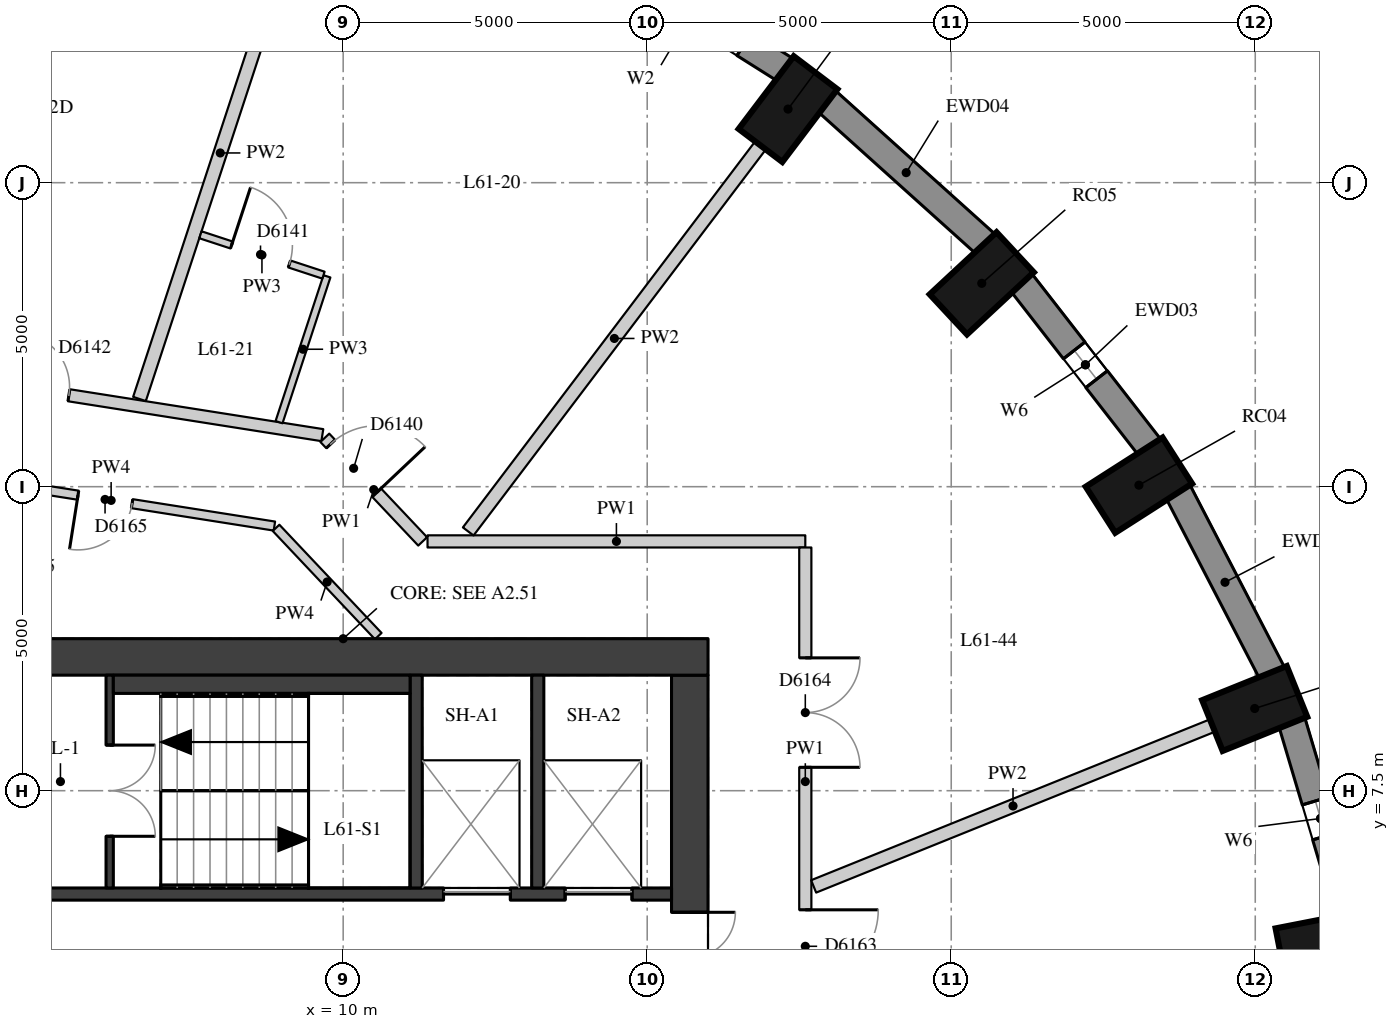
"""IFC4 building model, lengths in metres.
Left out: names, types, materials, properties, quantities, classifications, styles, units other than length and angle.
Written with IfcOpenShell. Run it as: python <this file> out.ifc"""

import sys

from ifc_helpers import new_model, si_unit, direction, frame, frame_2d, origin, origin_2d, place, context, subcontext, project, spatial, rectangle, extrude, element, fill, save


model = new_model("IFC4")
c1 = context("Model", 3, precision=1e-05, world=origin(), true_north=direction((0.0, 1.0)))
c2 = subcontext(c1, "Body", "Model", "MODEL_VIEW")
j1 = project(units=[si_unit("LENGTHUNIT", "METRE"), si_unit("PLANEANGLEUNIT", "RADIAN")], contexts=[c1])
p1 = place(None, origin())
s1 = spatial("IfcSite", under=j1, at=p1, CompositionType="ELEMENT")
p2 = place(p1, origin())
s2 = spatial("IfcBuilding", under=s1, at=p2, CompositionType="ELEMENT")
p3 = place(p2, frame((0.0, 0.0, 215.6)))
s3 = spatial("IfcBuildingStorey", under=s2, at=p3, CompositionType="ELEMENT", Elevation=215.6)
for number, where, z_axis, x_axis in (
    (1, (26.157, 4.937, 0.0), (0.0, 0.0, 1.0), (0.981, 0.192, 0.0)),
    (2, (24.991, 8.852, 0.0), (0.0, 0.0, 1.0), (0.927, 0.374, 0.0)),
    (3, (23.087, 12.525, 0.0), (0.0, 0.0, 1.0), (0.842, 0.539, 0.0)),
    (4, (20.502, 15.845, 0.0), (0.0, 0.0, 1.0), (0.732, 0.681, 0.0)),
    (5, (17.316, 18.71, 0.0), (0.0, 0.0, 1.0), (0.604, 0.797, 0.0)),
):
    element("IfcColumn", number, at=place(p3, frame(where, z_axis=z_axis, x_axis=x_axis)), inside=s3, PredefinedType="COLUMN", context=c2, shape_type="SweptSolid", body=[
        extrude(rectangle(XDim=1.5, YDim=0.9, at=origin_2d()), origin(), (0.0, 0.0, 1.0), 3.3),
    ])
p4 = place(p3, frame((26.548, 5.452, 0.0), z_axis=(0.0, 0.0, 1.0), x_axis=(-0.285444972963, 0.958395099847, 0.0)))
e6 = element("IfcWall", 6, at=p4, inside=s3, PredefinedType="SOLIDWALL", context=c2, shape_type="SweptSolid", body=[
    extrude(rectangle(XDim=3.32, YDim=0.45, at=frame_2d((1.66, 0.0))), origin(), (0.0, 0.0, 1.0), 3.02),
])
p5 = place(p4, frame((1.36, 0.0, 0.4)))
e7 = element("IfcOpeningElement", 7, at=p5, cuts=e6, PredefinedType="OPENING", context=c2, shape_type="SweptSolid", body=[
    extrude(rectangle(XDim=0.6, YDim=1.75, at=frame_2d((0.3, 0.875))), frame((0.0, 0.235, 0.0), z_axis=(0.0, -1.0, 0.0), x_axis=(1.0, 0.0, 0.0)), (0.0, 0.0, 1.0), 0.47),
])
p6 = place(p3, frame((25.278, 9.432, 0.0), z_axis=(0.0, 0.0, 1.0), x_axis=(-0.460175500475, 0.887827972505, 0.0)))
e8 = element("IfcWall", 8, at=p6, inside=s3, PredefinedType="SOLIDWALL", context=c2, shape_type="SweptSolid", body=[
    extrude(rectangle(XDim=3.371, YDim=0.45, at=frame_2d((1.685, 0.0))), origin(), (0.0, 0.0, 1.0), 3.02),
])
p7 = place(p3, frame((23.263, 13.148, 0.0), z_axis=(0.0, 0.0, 1.0), x_axis=(-0.614220816451, 0.789134201919, 0.0)))
e9 = element("IfcWall", 9, at=p7, inside=s3, PredefinedType="SOLIDWALL", context=c2, shape_type="SweptSolid", body=[
    extrude(rectangle(XDim=3.438, YDim=0.45, at=frame_2d((1.719, 0.0))), origin(), (0.0, 0.0, 1.0), 3.02),
])
p8 = place(p7, frame((1.419, 0.0, 0.4)))
e10 = element("IfcOpeningElement", 10, at=p8, cuts=e9, PredefinedType="OPENING", context=c2, shape_type="SweptSolid", body=[
    extrude(rectangle(XDim=0.6, YDim=1.75, at=frame_2d((0.3, 0.875))), frame((0.0, 0.235, 0.0), z_axis=(0.0, -1.0, 0.0), x_axis=(1.0, 0.0, 0.0)), (0.0, 0.0, 1.0), 0.47),
])
p9 = place(p3, frame((20.565, 16.49, 0.0), z_axis=(0.0, 0.0, 1.0), x_axis=(-0.743442727602, 0.668799604348, 0.0)))
e11 = element("IfcWall", 11, at=p9, inside=s3, PredefinedType="SOLIDWALL", context=c2, shape_type="SweptSolid", body=[
    extrude(rectangle(XDim=3.513, YDim=0.45, at=frame_2d((1.756, 0.0))), origin(), (0.0, 0.0, 1.0), 3.02),
])
p10 = place(p3, frame((17.267, 19.358, 0.0), z_axis=(0.0, 0.0, 1.0), x_axis=(-0.846119146727, 0.532993798783, 0.0)))
e12 = element("IfcWall", 12, at=p10, inside=s3, PredefinedType="SOLIDWALL", context=c2, shape_type="SweptSolid", body=[
    extrude(rectangle(XDim=3.587, YDim=0.45, at=frame_2d((1.793, 0.0))), origin(), (0.0, 0.0, 1.0), 3.02),
])
p11 = place(p10, frame((0.793, 0.0, 0.4)))
e13 = element("IfcOpeningElement", 13, at=p11, cuts=e12, PredefinedType="OPENING", context=c2, shape_type="SweptSolid", body=[
    extrude(rectangle(XDim=2.0, YDim=1.75, at=frame_2d((1.0, 0.875))), frame((0.0, 0.235, 0.0), z_axis=(0.0, -1.0, 0.0), x_axis=(1.0, 0.0, 0.0)), (0.0, 0.0, 1.0), 0.47),
])
p12 = place(p3, frame((15.7, -9.4, 0.0), z_axis=(0.0, 0.0, 1.0), x_axis=(0.0, 1.0, 0.0)))
e14 = element("IfcWall", 14, at=p12, inside=s3, PredefinedType="SHEAR", context=c2, shape_type="SweptSolid", body=[
    extrude(rectangle(XDim=18.8, YDim=0.6, at=frame_2d((9.4, 0.0))), origin(), (0.0, 0.0, 1.0), 3.02),
])
p13 = place(p12, frame((13.4, 0.0, 0.0)))
e15 = element("IfcOpeningElement", 15, at=p13, cuts=e14, PredefinedType="OPENING", context=c2, shape_type="SweptSolid", body=[
    extrude(rectangle(XDim=1.5, YDim=2.1, at=frame_2d((0.75, 1.05))), frame((0.0, 0.31, 0.0), z_axis=(0.0, -1.0, 0.0), x_axis=(1.0, 0.0, 0.0)), (0.0, 0.0, 1.0), 0.62),
])
p14 = place(p12, frame((3.9, 0.0, 0.0)))
e16 = element("IfcOpeningElement", 16, at=p14, cuts=e14, PredefinedType="OPENING", context=c2, shape_type="SweptSolid", body=[
    extrude(rectangle(XDim=1.5, YDim=2.1, at=frame_2d((0.75, 1.05))), frame((0.0, 0.31, 0.0), z_axis=(0.0, -1.0, 0.0), x_axis=(1.0, 0.0, 0.0)), (0.0, 0.0, 1.0), 0.62),
])
p15 = place(p3, frame((4.0, 9.7, 0.0), z_axis=(0.0, 0.0, 1.0), x_axis=(1.0, 0.0, 0.0)))
e17 = element("IfcWall", 17, at=p15, inside=s3, PredefinedType="SHEAR", context=c2, shape_type="SweptSolid", body=[
    extrude(rectangle(XDim=12.0, YDim=0.6, at=frame_2d((6.0, 0.0))), origin(), (0.0, 0.0, 1.0), 3.02),
])
p16 = place(p3, frame((4.6, 5.8, 0.0), z_axis=(0.0, 0.0, 1.0), x_axis=(1.0, 0.0, 0.0)))
e18 = element("IfcWall", 18, at=p16, inside=s3, PredefinedType="SHEAR", context=c2, shape_type="SweptSolid", body=[
    extrude(rectangle(XDim=10.8, YDim=0.2, at=frame_2d((5.4, 0.0))), origin(), (0.0, 0.0, 1.0), 3.02),
])
p17 = place(p16, frame((7.05, 0.0, 0.0)))
e19 = element("IfcOpeningElement", 19, at=p17, cuts=e18, PredefinedType="OPENING", context=c2, shape_type="SweptSolid", body=[
    extrude(rectangle(XDim=1.1, YDim=2.1, at=frame_2d((0.55, 1.05))), frame((0.0, 0.11, 0.0), z_axis=(0.0, -1.0, 0.0), x_axis=(1.0, 0.0, 0.0)), (0.0, 0.0, 1.0), 0.22),
])
p18 = place(p16, frame((9.05, 0.0, 0.0)))
e20 = element("IfcOpeningElement", 20, at=p18, cuts=e18, PredefinedType="OPENING", context=c2, shape_type="SweptSolid", body=[
    extrude(rectangle(XDim=1.1, YDim=2.1, at=frame_2d((0.55, 1.05))), frame((0.0, 0.11, 0.0), z_axis=(0.0, -1.0, 0.0), x_axis=(1.0, 0.0, 0.0)), (0.0, 0.0, 1.0), 0.22),
])
for number, where, z_axis, x_axis in (
    (21, (11.2, 5.9, 0.0), (0.0, 0.0, 1.0), (0.0, 1.0, 0.0)),
    (22, (13.2, 5.9, 0.0), (0.0, 0.0, 1.0), (0.0, 1.0, 0.0)),
):
    element("IfcWall", number, at=place(p3, frame(where, z_axis=z_axis, x_axis=x_axis)), inside=s3, PredefinedType="SHEAR", context=c2, shape_type="SweptSolid", body=[
        extrude(rectangle(XDim=3.5, YDim=0.2, at=frame_2d((1.75, 0.0))), origin(), (0.0, 0.0, 1.0), 3.02),
    ])
p19 = place(p3, frame((6.16, 5.9, 0.0), z_axis=(0.0, 0.0, 1.0), x_axis=(0.0, 1.0, 0.0)))
e23 = element("IfcWall", 23, at=p19, inside=s3, PredefinedType="SHEAR", context=c2, shape_type="SweptSolid", body=[
    extrude(rectangle(XDim=3.5, YDim=0.12, at=frame_2d((1.75, 0.0))), origin(), (0.0, 0.0, 1.0), 3.02),
])
p20 = place(p19, frame((0.85, 0.0, 0.0)))
e24 = element("IfcOpeningElement", 24, at=p20, cuts=e23, PredefinedType="OPENING", context=c2, shape_type="SweptSolid", body=[
    extrude(rectangle(XDim=1.5, YDim=2.1, at=frame_2d((0.75, 1.05))), frame((0.0, 0.07, 0.0), z_axis=(0.0, -1.0, 0.0), x_axis=(1.0, 0.0, 0.0)), (0.0, 0.0, 1.0), 0.14),
])
p21 = place(p3, frame((6.22, 9.25, 0.0), z_axis=(0.0, 0.0, 1.0), x_axis=(1.0, 0.0, 0.0)))
e25 = element("IfcWall", 25, at=p21, inside=s3, PredefinedType="PARTITIONING", context=c2, shape_type="SweptSolid", body=[
    extrude(rectangle(XDim=4.88, YDim=0.3, at=frame_2d((2.44, 0.0))), origin(), (0.0, 0.0, 1.0), 3.02),
])
p22 = place(p3, frame((-2.383, 15.243, 0.0), z_axis=(0.0, 0.0, 1.0), x_axis=(0.987842256944, -0.15545956193, 0.0)))
e26 = element("IfcWall", 26, at=p22, inside=s3, PredefinedType="PARTITIONING", context=c2, shape_type="SweptSolid", body=[
    extrude(rectangle(XDim=12.188, YDim=0.2, at=frame_2d((6.094, 0.0))), origin(), (0.0, 0.0, 1.0), 2.42),
])
p23 = place(p22, frame((7.069, 0.0, 0.0)))
e27 = element("IfcOpeningElement", 27, at=p23, cuts=e26, PredefinedType="OPENING", context=c2, shape_type="SweptSolid", body=[
    extrude(rectangle(XDim=0.9, YDim=2.1, at=frame_2d((0.45, 1.05))), frame((0.0, 0.11, 0.0), z_axis=(0.0, -1.0, 0.0), x_axis=(1.0, 0.0, 0.0)), (0.0, 0.0, 1.0), 0.22),
])
p24 = place(p22, frame((3.676, 0.0, 0.0)))
e28 = element("IfcOpeningElement", 28, at=p24, cuts=e26, PredefinedType="OPENING", context=c2, shape_type="SweptSolid", body=[
    extrude(rectangle(XDim=0.9, YDim=2.1, at=frame_2d((0.45, 1.05))), frame((0.0, 0.11, 0.0), z_axis=(0.0, -1.0, 0.0), x_axis=(1.0, 0.0, 0.0)), (0.0, 0.0, 1.0), 0.22),
])
p25 = place(p22, frame((1.875, 0.0, 0.0)))
e29 = element("IfcOpeningElement", 29, at=p25, cuts=e26, PredefinedType="OPENING", context=c2, shape_type="SweptSolid", body=[
    extrude(rectangle(XDim=0.9, YDim=2.1, at=frame_2d((0.45, 1.05))), frame((0.0, 0.11, 0.0), z_axis=(0.0, -1.0, 0.0), x_axis=(1.0, 0.0, 0.0)), (0.0, 0.0, 1.0), 0.22),
])
p26 = place(p3, frame((9.698, 13.304, 0.0), z_axis=(0.0, 0.0, 1.0), x_axis=(0.686553169295, -0.727079600684, 0.0)))
e30 = element("IfcWall", 30, at=p26, inside=s3, PredefinedType="PARTITIONING", context=c2, shape_type="SweptSolid", body=[
    extrude(rectangle(XDim=2.344, YDim=0.2, at=frame_2d((1.172, 0.0))), origin(), (0.0, 0.0, 1.0), 3.02),
])
p27 = place(p26, frame((0.14, 0.0, 0.0)))
e31 = element("IfcOpeningElement", 31, at=p27, cuts=e30, PredefinedType="OPENING", context=c2, shape_type="SweptSolid", body=[
    extrude(rectangle(XDim=1.1, YDim=2.1, at=frame_2d((0.55, 1.05))), frame((0.0, 0.11, 0.0), z_axis=(0.0, -1.0, 0.0), x_axis=(1.0, 0.0, 0.0)), (0.0, 0.0, 1.0), 0.22),
])
p28 = place(p3, frame((11.387, 11.6, 0.0), z_axis=(0.0, 0.0, 1.0), x_axis=(1.0, 0.0, 0.0)))
e32 = element("IfcWall", 32, at=p28, inside=s3, PredefinedType="PARTITIONING", context=c2, shape_type="SweptSolid", body=[
    extrude(rectangle(XDim=6.213, YDim=0.2, at=frame_2d((3.106, 0.0))), origin(), (0.0, 0.0, 1.0), 3.02),
])
p29 = place(p3, frame((17.6, 11.5, 0.0), z_axis=(0.0, 0.0, 1.0), x_axis=(0.0, -1.0, 0.0)))
e33 = element("IfcWall", 33, at=p29, inside=s3, PredefinedType="PARTITIONING", context=c2, shape_type="SweptSolid", body=[
    extrude(rectangle(XDim=7.7, YDim=0.2, at=frame_2d((3.85, 0.0))), origin(), (0.0, 0.0, 1.0), 3.02),
])
p30 = place(p29, frame((5.959, 0.0, 0.0)))
e34 = element("IfcOpeningElement", 34, at=p30, cuts=e33, PredefinedType="OPENING", context=c2, shape_type="SweptSolid", body=[
    extrude(rectangle(XDim=1.2, YDim=2.1, at=frame_2d((0.6, 1.05))), frame((0.0, 0.11, 0.0), z_axis=(0.0, -1.0, 0.0), x_axis=(1.0, 0.0, 0.0)), (0.0, 0.0, 1.0), 0.22),
])
p31 = place(p29, frame((1.815, 0.0, 0.0)))
e35 = element("IfcOpeningElement", 35, at=p31, cuts=e33, PredefinedType="OPENING", context=c2, shape_type="SweptSolid", body=[
    extrude(rectangle(XDim=1.8, YDim=2.1, at=frame_2d((0.9, 1.05))), frame((0.0, 0.11, 0.0), z_axis=(0.0, -1.0, 0.0), x_axis=(1.0, 0.0, 0.0)), (0.0, 0.0, 1.0), 0.22),
])
p32 = place(p3, frame((3.499, 12.697, 0.0), z_axis=(0.0, 0.0, 1.0), x_axis=(0.987853106423, -0.155390605029, 0.0)))
e36 = element("IfcWall", 36, at=p32, inside=s3, PredefinedType="PARTITIONING", context=c2, shape_type="SweptSolid", body=[
    extrude(rectangle(XDim=5.436, YDim=0.15, at=frame_2d((2.718, 0.0))), origin(), (0.0, 0.0, 1.0), 3.02),
])
p33 = place(p32, frame((2.167, 0.0, 0.0)))
e37 = element("IfcOpeningElement", 37, at=p33, cuts=e36, PredefinedType="OPENING", context=c2, shape_type="SweptSolid", body=[
    extrude(rectangle(XDim=0.9, YDim=2.1, at=frame_2d((0.45, 1.05))), frame((0.0, 0.085, 0.0), z_axis=(0.0, -1.0, 0.0), x_axis=(1.0, 0.0, 0.0)), (0.0, 0.0, 1.0), 0.17),
])
p34 = place(p3, frame((8.896, 11.823, 0.0), z_axis=(0.0, 0.0, 1.0), x_axis=(0.686471254033, -0.727156941373, 0.0)))
e38 = element("IfcWall", 38, at=p34, inside=s3, PredefinedType="PARTITIONING", context=c2, shape_type="SweptSolid", body=[
    extrude(rectangle(XDim=2.448, YDim=0.15, at=frame_2d((1.224, 0.0))), origin(), (0.0, 0.0, 1.0), 3.02),
])
p35 = place(p3, frame((24.295, 8.571, 0.0), z_axis=(0.0, 0.0, 1.0), x_axis=(-0.927386999215, -0.374103399728, 0.0)))
e39 = element("IfcWall", 39, at=p35, inside=s3, PredefinedType="PARTITIONING", context=c2, shape_type="SweptSolid", body=[
    extrude(rectangle(XDim=7.072, YDim=0.22, at=frame_2d((3.536, 0.0))), origin(), (0.0, 0.0, 1.0), 3.02),
])
p36 = place(p3, frame((16.863, 18.113, 0.0), z_axis=(0.0, 0.0, 1.0), x_axis=(-0.603628639054, -0.797265618294, 0.0)))
e40 = element("IfcWall", 40, at=p36, inside=s3, PredefinedType="PARTITIONING", context=c2, shape_type="SweptSolid", body=[
    extrude(rectangle(XDim=7.963, YDim=0.22, at=frame_2d((3.982, 0.0))), origin(), (0.0, 0.0, 1.0), 3.02),
])
p37 = place(p3, frame((9.307, 22.035, 0.0), z_axis=(0.0, 0.0, 1.0), x_axis=(-0.311959631661, -0.950095357432, 0.0)))
e41 = element("IfcWall", 41, at=p37, inside=s3, PredefinedType="PARTITIONING", context=c2, shape_type="SweptSolid", body=[
    extrude(rectangle(XDim=8.518, YDim=0.22, at=frame_2d((4.259, 0.0))), origin(), (0.0, 0.0, 1.0), 3.02),
])
p38 = place(p3, frame((8.945, 13.561, 0.0), z_axis=(0.0, 0.0, 1.0), x_axis=(0.311960021399, 0.950095229463, 0.0)))
e42 = element("IfcWall", 42, at=p38, inside=s3, PredefinedType="PARTITIONING", context=c2, shape_type="SweptSolid", body=[
    extrude(rectangle(XDim=2.525, YDim=0.12, at=frame_2d((1.262, 0.0))), origin(), (0.0, 0.0, 1.0), 3.02),
])
p39 = place(p3, frame((9.676, 15.979, 0.0), z_axis=(0.0, 0.0, 1.0), x_axis=(-0.950106513103, 0.311925654217, 0.0)))
e43 = element("IfcWall", 43, at=p39, inside=s3, PredefinedType="PARTITIONING", context=c2, shape_type="SweptSolid", body=[
    extrude(rectangle(XDim=2.13, YDim=0.12, at=frame_2d((1.065, 0.0))), origin(), (0.0, 0.0, 1.0), 3.02),
])
p40 = place(p39, frame((0.59, 0.0, 0.0)))
e44 = element("IfcOpeningElement", 44, at=p40, cuts=e43, PredefinedType="OPENING", context=c2, shape_type="SweptSolid", body=[
    extrude(rectangle(XDim=1.0, YDim=2.1, at=frame_2d((0.5, 1.05))), frame((0.0, 0.07, 0.0), z_axis=(0.0, -1.0, 0.0), x_axis=(1.0, 0.0, 0.0)), (0.0, 0.0, 1.0), 0.14),
])
p41 = place(p5, origin())
e45 = element("IfcWindow", 45, at=p41, inside=s3, PartitioningType="SINGLE_PANEL", PredefinedType="WINDOW", context=c2, shape_type="SweptSolid", body=[
    extrude(rectangle(XDim=0.6, YDim=1.75, at=frame_2d((0.3, 0.875))), frame((0.0, 0.035, 0.0), z_axis=(0.0, -1.0, 0.0), x_axis=(1.0, 0.0, 0.0)), (0.0, 0.0, 1.0), 0.06),
])
fill(e7, e45)
p42 = place(p8, origin())
e46 = element("IfcWindow", 46, at=p42, inside=s3, PartitioningType="SINGLE_PANEL", PredefinedType="WINDOW", context=c2, shape_type="SweptSolid", body=[
    extrude(rectangle(XDim=0.6, YDim=1.75, at=frame_2d((0.3, 0.875))), frame((0.0, 0.035, 0.0), z_axis=(0.0, -1.0, 0.0), x_axis=(1.0, 0.0, 0.0)), (0.0, 0.0, 1.0), 0.06),
])
fill(e10, e46)
p43 = place(p13, origin())
e47 = element("IfcDoor", 47, at=p43, inside=s3, OperationType="DOUBLE_DOOR_SINGLE_SWING", PredefinedType="DOOR", context=c2, shape_type="SweptSolid", body=[
    extrude(rectangle(XDim=1.5, YDim=2.1, at=frame_2d((0.75, 1.05))), frame((0.0, 0.025, 0.0), z_axis=(0.0, -1.0, 0.0), x_axis=(1.0, 0.0, 0.0)), (0.0, 0.0, 1.0), 0.05),
])
fill(e15, e47)
p44 = place(p20, origin())
e48 = element("IfcDoor", 48, at=p44, inside=s3, OperationType="DOUBLE_DOOR_SINGLE_SWING", PredefinedType="DOOR", context=c2, shape_type="SweptSolid", body=[
    extrude(rectangle(XDim=1.5, YDim=2.1, at=frame_2d((0.75, 1.05))), frame((0.0, 0.025, 0.0), z_axis=(0.0, -1.0, 0.0), x_axis=(1.0, 0.0, 0.0)), (0.0, 0.0, 1.0), 0.05),
])
fill(e24, e48)
p45 = place(p17, origin())
e49 = element("IfcDoor", 49, at=p45, inside=s3, OperationType="DOUBLE_DOOR_SLIDING", PredefinedType="DOOR", context=c2, shape_type="SweptSolid", body=[
    extrude(rectangle(XDim=1.1, YDim=2.1, at=frame_2d((0.55, 1.05))), frame((0.0, 0.025, 0.0), z_axis=(0.0, -1.0, 0.0), x_axis=(1.0, 0.0, 0.0)), (0.0, 0.0, 1.0), 0.05),
])
fill(e19, e49)
p46 = place(p18, origin())
e50 = element("IfcDoor", 50, at=p46, inside=s3, OperationType="DOUBLE_DOOR_SLIDING", PredefinedType="DOOR", context=c2, shape_type="SweptSolid", body=[
    extrude(rectangle(XDim=1.1, YDim=2.1, at=frame_2d((0.55, 1.05))), frame((0.0, 0.025, 0.0), z_axis=(0.0, -1.0, 0.0), x_axis=(1.0, 0.0, 0.0)), (0.0, 0.0, 1.0), 0.05),
])
fill(e20, e50)
p47 = place(p27, origin())
e51 = element("IfcDoor", 51, at=p47, inside=s3, OperationType="SINGLE_SWING_RIGHT", PredefinedType="DOOR", context=c2, shape_type="SweptSolid", body=[
    extrude(rectangle(XDim=1.1, YDim=2.1, at=frame_2d((0.55, 1.05))), frame((0.0, 0.025, 0.0), z_axis=(0.0, -1.0, 0.0), x_axis=(1.0, 0.0, 0.0)), (0.0, 0.0, 1.0), 0.05),
])
fill(e31, e51)
p48 = place(p40, origin())
e52 = element("IfcDoor", 52, at=p48, inside=s3, OperationType="SINGLE_SWING_LEFT", PredefinedType="DOOR", context=c2, shape_type="SweptSolid", body=[
    extrude(rectangle(XDim=1.0, YDim=2.1, at=frame_2d((0.5, 1.05))), frame((0.0, 0.025, 0.0), z_axis=(0.0, -1.0, 0.0), x_axis=(1.0, 0.0, 0.0)), (0.0, 0.0, 1.0), 0.05),
])
fill(e44, e52)
p49 = place(p23, origin())
e53 = element("IfcDoor", 53, at=p49, inside=s3, OperationType="SINGLE_SWING_LEFT", PredefinedType="DOOR", context=c2, shape_type="SweptSolid", body=[
    extrude(rectangle(XDim=0.9, YDim=2.1, at=frame_2d((0.45, 1.05))), frame((0.0, 0.025, 0.0), z_axis=(0.0, -1.0, 0.0), x_axis=(1.0, 0.0, 0.0)), (0.0, 0.0, 1.0), 0.05),
])
fill(e27, e53)
p50 = place(p30, origin())
e54 = element("IfcDoor", 54, at=p50, inside=s3, OperationType="SINGLE_SWING_LEFT", PredefinedType="DOOR", context=c2, shape_type="SweptSolid", body=[
    extrude(rectangle(XDim=1.2, YDim=2.1, at=frame_2d((0.6, 1.05))), frame((0.0, 0.025, 0.0), z_axis=(0.0, -1.0, 0.0), x_axis=(1.0, 0.0, 0.0)), (0.0, 0.0, 1.0), 0.05),
])
fill(e34, e54)
p51 = place(p31, origin())
e55 = element("IfcDoor", 55, at=p51, inside=s3, OperationType="DOUBLE_DOOR_SINGLE_SWING", PredefinedType="DOOR", context=c2, shape_type="SweptSolid", body=[
    extrude(rectangle(XDim=1.8, YDim=2.1, at=frame_2d((0.9, 1.05))), frame((0.0, 0.025, 0.0), z_axis=(0.0, -1.0, 0.0), x_axis=(1.0, 0.0, 0.0)), (0.0, 0.0, 1.0), 0.05),
])
fill(e35, e55)
p52 = place(p33, origin())
e56 = element("IfcDoor", 56, at=p52, inside=s3, OperationType="SINGLE_SWING_RIGHT", PredefinedType="DOOR", context=c2, shape_type="SweptSolid", body=[
    extrude(rectangle(XDim=0.9, YDim=2.1, at=frame_2d((0.45, 1.05))), frame((0.0, 0.025, 0.0), z_axis=(0.0, -1.0, 0.0), x_axis=(1.0, 0.0, 0.0)), (0.0, 0.0, 1.0), 0.05),
])
fill(e37, e56)
save(model, sys.argv[1])
